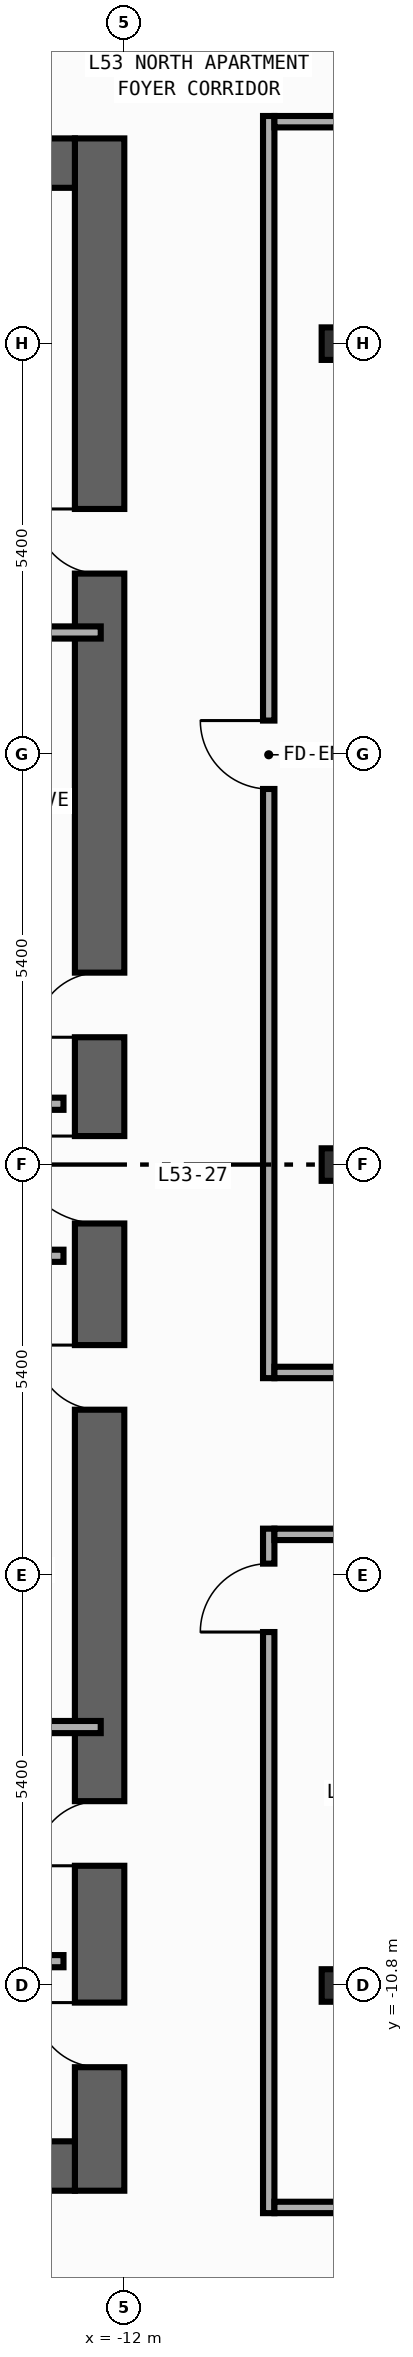
"""IFC4 building model, lengths in metres.
Left out: names, types, materials, properties, quantities, classifications, styles, units other than length and angle.
Written with IfcOpenShell. Run it as: python <this file> out.ifc"""

import sys

from ifc_helpers import new_model, si_unit, direction, frame, frame_2d, origin, origin_2d, place, context, subcontext, project, spatial, rectangle, i_section, extrude, element, fill, save


model = new_model("IFC4")
c1 = context("Model", 3, precision=1e-05, world=origin(), true_north=direction((0.0, 1.0)))
c2 = subcontext(c1, "Body", "Model", "MODEL_VIEW")
j1 = project(units=[si_unit("LENGTHUNIT", "METRE"), si_unit("PLANEANGLEUNIT", "RADIAN")], contexts=[c1])
p1 = place(None, origin())
s1 = spatial("IfcSite", under=j1, at=p1, CompositionType="ELEMENT")
p2 = place(p1, origin())
s2 = spatial("IfcBuilding", under=s1, at=p2, CompositionType="ELEMENT")
p3 = place(p2, frame((0.0, 0.0, 229.6)))
s3 = spatial("IfcBuildingStorey", under=s2, at=p3, CompositionType="ELEMENT", Elevation=229.6)
p4 = place(p3, frame((-12.325, -13.5, 0.0), z_axis=(0.0, 0.0, 1.0), x_axis=(0.0, 1.0, 0.0)))
e1 = element("IfcWall", 1, at=p4, inside=s3, PredefinedType="SHEAR", context=c2, shape_type="SweptSolid", body=[
    extrude(rectangle(XDim=27.0, YDim=0.65, at=frame_2d((13.5, 0.0))), origin(), (0.0, 0.0, 1.0), 3.34),
])
p5 = place(p4, frame((15.175, 0.0, 0.0)))
e2 = element("IfcOpeningElement", 2, at=p5, cuts=e1, PredefinedType="OPENING", context=c2, shape_type="SweptSolid", body=[
    extrude(rectangle(XDim=0.85, YDim=2.1, at=frame_2d((0.425, 1.05))), frame((0.0, 0.335, 0.0), z_axis=(0.0, -1.0, 0.0), x_axis=(1.0, 0.0, 0.0)), (0.0, 0.0, 1.0), 0.67),
])
p6 = place(p4, frame((21.275, 0.0, 0.0)))
e3 = element("IfcOpeningElement", 3, at=p6, cuts=e1, PredefinedType="OPENING", context=c2, shape_type="SweptSolid", body=[
    extrude(rectangle(XDim=0.85, YDim=2.1, at=frame_2d((0.425, 1.05))), frame((0.0, 0.335, 0.0), z_axis=(0.0, -1.0, 0.0), x_axis=(1.0, 0.0, 0.0)), (0.0, 0.0, 1.0), 0.67),
])
p7 = place(p4, frame((4.275, 0.0, 0.0)))
e4 = element("IfcOpeningElement", 4, at=p7, cuts=e1, PredefinedType="OPENING", context=c2, shape_type="SweptSolid", body=[
    extrude(rectangle(XDim=0.85, YDim=2.1, at=frame_2d((0.425, 1.05))), frame((0.0, 0.335, 0.0), z_axis=(0.0, -1.0, 0.0), x_axis=(1.0, 0.0, 0.0)), (0.0, 0.0, 1.0), 0.67),
])
p8 = place(p4, frame((10.275, 0.0, 0.0)))
e5 = element("IfcOpeningElement", 5, at=p8, cuts=e1, PredefinedType="OPENING", context=c2, shape_type="SweptSolid", body=[
    extrude(rectangle(XDim=0.85, YDim=2.1, at=frame_2d((0.425, 1.05))), frame((0.0, 0.335, 0.0), z_axis=(0.0, -1.0, 0.0), x_axis=(1.0, 0.0, 0.0)), (0.0, 0.0, 1.0), 0.67),
])
p9 = place(p4, frame((12.725, 0.0, 0.0)))
e6 = element("IfcOpeningElement", 6, at=p9, cuts=e1, PredefinedType="OPENING", context=c2, shape_type="SweptSolid", body=[
    extrude(rectangle(XDim=1.15, YDim=2.2, at=frame_2d((0.575, 1.1))), frame((0.0, 0.335, 0.0), z_axis=(0.0, -1.0, 0.0), x_axis=(1.0, 0.0, 0.0)), (0.0, 0.0, 1.0), 0.67),
])
p10 = place(p4, frame((1.625, 0.0, 0.0)))
e7 = element("IfcOpeningElement", 7, at=p10, cuts=e1, PredefinedType="OPENING", context=c2, shape_type="SweptSolid", body=[
    extrude(rectangle(XDim=0.85, YDim=2.1, at=frame_2d((0.425, 1.05))), frame((0.0, 0.335, 0.0), z_axis=(0.0, -1.0, 0.0), x_axis=(1.0, 0.0, 0.0)), (0.0, 0.0, 1.0), 0.67),
])
for number, where, z_axis, x_axis in (
    (8, (-19.75, -13.175, 0.0), (0.0, 0.0, 1.0), (1.0, 0.0, 0.0)),
    (9, (-19.75, 13.175, 0.0), (0.0, 0.0, 1.0), (1.0, 0.0, 0.0)),
):
    element("IfcWall", number, at=place(p3, frame(where, z_axis=z_axis, x_axis=x_axis)), inside=s3, PredefinedType="SHEAR", context=c2, shape_type="SweptSolid", body=[
        extrude(rectangle(XDim=7.1, YDim=0.65, at=frame_2d((3.55, 0.0))), origin(), (0.0, 0.0, 1.0), 3.34),
    ])
for number, where, z_axis, x_axis in (
    (10, (-9.2, -10.8, 0.0), (0.0, 0.0, 1.0), (1.0, 0.0, 0.0)),
    (11, (-9.2, 0.0, 0.0), (0.0, 0.0, 1.0), (1.0, 0.0, 0.0)),
    (12, (-9.2, 10.8, 0.0), (0.0, 0.0, 1.0), (1.0, 0.0, 0.0)),
):
    element("IfcColumn", number, at=place(p3, frame(where, z_axis=z_axis, x_axis=x_axis)), inside=s3, PredefinedType="COLUMN", context=c2, shape_type="SweptSolid", body=[
        extrude(i_section(OverallWidth=0.407, OverallDepth=0.428, WebThickness=0.02, FlangeThickness=0.035, FilletRadius=0.022, at=origin_2d()), origin(), (0.0, 0.0, 1.0), 3.6),
    ])
for number, where, z_axis, x_axis in (
    (13, (-15.4, 0.8, 0.0), (0.0, 0.0, 1.0), (1.0, 0.0, 0.0)),
    (14, (-15.4, -1.2, 0.0), (0.0, 0.0, 1.0), (1.0, 0.0, 0.0)),
    (15, (-15.4, -10.48, 0.0), (0.0, 0.0, 1.0), (1.0, 0.0, 0.0)),
):
    element("IfcWall", number, at=place(p3, frame(where, z_axis=z_axis, x_axis=x_axis)), inside=s3, PredefinedType="STANDARD", context=c2, shape_type="SweptSolid", body=[
        extrude(rectangle(XDim=2.6, YDim=0.16, at=frame_2d((1.3, 0.0))), origin(), (0.0, 0.0, 1.0), 3.34),
    ])
for number, where, z_axis, x_axis in (
    (16, (-15.375, 7.0, 0.0), (0.0, 0.0, 1.0), (1.0, 0.0, 0.0)),
    (17, (-15.375, -7.4, 0.0), (0.0, 0.0, 1.0), (1.0, 0.0, 0.0)),
):
    element("IfcWall", number, at=place(p3, frame(where, z_axis=z_axis, x_axis=x_axis)), inside=s3, PredefinedType="PARTITIONING", context=c2, shape_type="SweptSolid", body=[
        extrude(rectangle(XDim=3.065, YDim=0.16, at=frame_2d((1.532, 0.0))), origin(), (0.0, 0.0, 1.0), 3.34),
    ])
p11 = place(p3, frame((-10.1, -2.81, 0.0), z_axis=(0.0, 0.0, 1.0), x_axis=(0.0, 1.0, 0.0)))
e18 = element("IfcWall", 18, at=p11, inside=s3, PredefinedType="PARTITIONING", context=c2, shape_type="SweptSolid", body=[
    extrude(rectangle(XDim=16.605, YDim=0.15, at=frame_2d((8.302, 0.0))), origin(), (0.0, 0.0, 1.0), 3.34),
])
p12 = place(p11, frame((7.751, 0.0, 0.0)))
e19 = element("IfcOpeningElement", 19, at=p12, cuts=e18, PredefinedType="OPENING", context=c2, shape_type="SweptSolid", body=[
    extrude(rectangle(XDim=0.9, YDim=2.15, at=frame_2d((0.45, 1.075))), frame((0.0, 0.085, 0.0), z_axis=(0.0, -1.0, 0.0), x_axis=(1.0, 0.0, 0.0)), (0.0, 0.0, 1.0), 0.17),
])
p13 = place(p3, frame((-10.1, -13.795, 0.0), z_axis=(0.0, 0.0, 1.0), x_axis=(0.0, 1.0, 0.0)))
e20 = element("IfcWall", 20, at=p13, inside=s3, PredefinedType="PARTITIONING", context=c2, shape_type="SweptSolid", body=[
    extrude(rectangle(XDim=9.005, YDim=0.15, at=frame_2d((4.502, 0.0))), origin(), (0.0, 0.0, 1.0), 3.34),
])
p14 = place(p13, frame((7.645, 0.0, 0.0)))
e21 = element("IfcOpeningElement", 21, at=p14, cuts=e20, PredefinedType="OPENING", context=c2, shape_type="SweptSolid", body=[
    extrude(rectangle(XDim=0.9, YDim=2.15, at=frame_2d((0.45, 1.075))), frame((0.0, 0.085, 0.0), z_axis=(0.0, -1.0, 0.0), x_axis=(1.0, 0.0, 0.0)), (0.0, 0.0, 1.0), 0.17),
])
p15 = place(p3, frame((-10.025, -2.735, 0.0), z_axis=(0.0, 0.0, 1.0), x_axis=(1.0, 0.0, 0.0)))
e22 = element("IfcWall", 22, at=p15, inside=s3, PredefinedType="PARTITIONING", context=c2, shape_type="SweptSolid", body=[
    extrude(rectangle(XDim=5.035, YDim=0.15, at=frame_2d((2.518, 0.0))), origin(), (0.0, 0.0, 1.0), 3.34),
])
p16 = place(p15, frame((3.675, 0.0, 0.0)))
e23 = element("IfcOpeningElement", 23, at=p16, cuts=e22, PredefinedType="OPENING", context=c2, shape_type="SweptSolid", body=[
    extrude(rectangle(XDim=0.9, YDim=2.15, at=frame_2d((0.45, 1.075))), frame((0.0, 0.085, 0.0), z_axis=(0.0, -1.0, 0.0), x_axis=(1.0, 0.0, 0.0)), (0.0, 0.0, 1.0), 0.17),
])
p17 = place(p3, frame((-10.025, -4.865, 0.0), z_axis=(0.0, 0.0, 1.0), x_axis=(1.0, 0.0, 0.0)))
e24 = element("IfcWall", 24, at=p17, inside=s3, PredefinedType="PARTITIONING", context=c2, shape_type="SweptSolid", body=[
    extrude(rectangle(XDim=5.055, YDim=0.15, at=frame_2d((2.527, 0.0))), origin(), (0.0, 0.0, 1.0), 3.34),
])
p18 = place(p17, frame((3.695, 0.0, 0.0)))
e25 = element("IfcOpeningElement", 25, at=p18, cuts=e24, PredefinedType="OPENING", context=c2, shape_type="SweptSolid", body=[
    extrude(rectangle(XDim=0.9, YDim=2.15, at=frame_2d((0.45, 1.075))), frame((0.0, 0.085, 0.0), z_axis=(0.0, -1.0, 0.0), x_axis=(1.0, 0.0, 0.0)), (0.0, 0.0, 1.0), 0.17),
])
p19 = place(p3, frame((-10.025, 13.72, 0.0), z_axis=(0.0, 0.0, 1.0), x_axis=(1.0, 0.0, 0.0)))
e26 = element("IfcWall", 26, at=p19, inside=s3, PredefinedType="PARTITIONING", context=c2, shape_type="SweptSolid", body=[
    extrude(rectangle(XDim=4.885, YDim=0.15, at=frame_2d((2.442, 0.0))), origin(), (0.0, 0.0, 1.0), 3.34),
])
p20 = place(p19, frame((3.525, 0.0, 0.0)))
e27 = element("IfcOpeningElement", 27, at=p20, cuts=e26, PredefinedType="OPENING", context=c2, shape_type="SweptSolid", body=[
    extrude(rectangle(XDim=0.9, YDim=2.15, at=frame_2d((0.45, 1.075))), frame((0.0, 0.085, 0.0), z_axis=(0.0, -1.0, 0.0), x_axis=(1.0, 0.0, 0.0)), (0.0, 0.0, 1.0), 0.17),
])
p21 = place(p3, frame((-10.025, -13.72, 0.0), z_axis=(0.0, 0.0, 1.0), x_axis=(1.0, 0.0, 0.0)))
e28 = element("IfcWall", 28, at=p21, inside=s3, PredefinedType="PARTITIONING", context=c2, shape_type="SweptSolid", body=[
    extrude(rectangle(XDim=5.055, YDim=0.15, at=frame_2d((2.527, 0.0))), origin(), (0.0, 0.0, 1.0), 3.34),
])
p22 = place(p21, frame((3.695, 0.0, 0.0)))
e29 = element("IfcOpeningElement", 29, at=p22, cuts=e28, PredefinedType="OPENING", context=c2, shape_type="SweptSolid", body=[
    extrude(rectangle(XDim=0.9, YDim=2.15, at=frame_2d((0.45, 1.075))), frame((0.0, 0.085, 0.0), z_axis=(0.0, -1.0, 0.0), x_axis=(1.0, 0.0, 0.0)), (0.0, 0.0, 1.0), 0.17),
])
p23 = place(p5, origin())
e30 = element("IfcDoor", 30, at=p23, inside=s3, OperationType="SINGLE_SWING_LEFT", PredefinedType="DOOR", context=c2, shape_type="SweptSolid", body=[
    extrude(rectangle(XDim=0.85, YDim=2.1, at=frame_2d((0.425, 1.05))), frame((0.0, 0.025, 0.0), z_axis=(0.0, -1.0, 0.0), x_axis=(1.0, 0.0, 0.0)), (0.0, 0.0, 1.0), 0.05),
])
fill(e2, e30)
p24 = place(p6, origin())
e31 = element("IfcDoor", 31, at=p24, inside=s3, OperationType="SINGLE_SWING_RIGHT", PredefinedType="DOOR", context=c2, shape_type="SweptSolid", body=[
    extrude(rectangle(XDim=0.85, YDim=2.1, at=frame_2d((0.425, 1.05))), frame((0.0, 0.025, 0.0), z_axis=(0.0, -1.0, 0.0), x_axis=(1.0, 0.0, 0.0)), (0.0, 0.0, 1.0), 0.05),
])
fill(e3, e31)
p25 = place(p7, origin())
e32 = element("IfcDoor", 32, at=p25, inside=s3, OperationType="SINGLE_SWING_LEFT", PredefinedType="DOOR", context=c2, shape_type="SweptSolid", body=[
    extrude(rectangle(XDim=0.85, YDim=2.1, at=frame_2d((0.425, 1.05))), frame((0.0, 0.025, 0.0), z_axis=(0.0, -1.0, 0.0), x_axis=(1.0, 0.0, 0.0)), (0.0, 0.0, 1.0), 0.05),
])
fill(e4, e32)
p26 = place(p8, origin())
e33 = element("IfcDoor", 33, at=p26, inside=s3, OperationType="SINGLE_SWING_RIGHT", PredefinedType="DOOR", context=c2, shape_type="SweptSolid", body=[
    extrude(rectangle(XDim=0.85, YDim=2.1, at=frame_2d((0.425, 1.05))), frame((0.0, 0.025, 0.0), z_axis=(0.0, -1.0, 0.0), x_axis=(1.0, 0.0, 0.0)), (0.0, 0.0, 1.0), 0.05),
])
fill(e5, e33)
p27 = place(p9, origin())
e34 = element("IfcDoor", 34, at=p27, inside=s3, OperationType="SINGLE_SWING_RIGHT", PredefinedType="DOOR", context=c2, shape_type="SweptSolid", body=[
    extrude(rectangle(XDim=1.15, YDim=2.2, at=frame_2d((0.575, 1.1))), frame((0.0, 0.025, 0.0), z_axis=(0.0, -1.0, 0.0), x_axis=(1.0, 0.0, 0.0)), (0.0, 0.0, 1.0), 0.05),
])
fill(e6, e34)
p28 = place(p10, origin())
e35 = element("IfcDoor", 35, at=p28, inside=s3, OperationType="SINGLE_SWING_RIGHT", PredefinedType="DOOR", context=c2, shape_type="SweptSolid", body=[
    extrude(rectangle(XDim=0.85, YDim=2.1, at=frame_2d((0.425, 1.05))), frame((0.0, 0.025, 0.0), z_axis=(0.0, -1.0, 0.0), x_axis=(1.0, 0.0, 0.0)), (0.0, 0.0, 1.0), 0.05),
])
fill(e7, e35)
p29 = place(p12, origin())
e36 = element("IfcDoor", 36, at=p29, inside=s3, OperationType="SINGLE_SWING_RIGHT", PredefinedType="DOOR", context=c2, shape_type="SweptSolid", body=[
    extrude(rectangle(XDim=0.9, YDim=2.15, at=frame_2d((0.45, 1.075))), frame((0.0, 0.025, 0.0), z_axis=(0.0, -1.0, 0.0), x_axis=(1.0, 0.0, 0.0)), (0.0, 0.0, 1.0), 0.05),
])
fill(e19, e36)
p30 = place(p14, origin())
e37 = element("IfcDoor", 37, at=p30, inside=s3, OperationType="SINGLE_SWING_LEFT", PredefinedType="DOOR", context=c2, shape_type="SweptSolid", body=[
    extrude(rectangle(XDim=0.9, YDim=2.15, at=frame_2d((0.45, 1.075))), frame((0.0, 0.025, 0.0), z_axis=(0.0, -1.0, 0.0), x_axis=(1.0, 0.0, 0.0)), (0.0, 0.0, 1.0), 0.05),
])
fill(e21, e37)
save(model, sys.argv[1])
